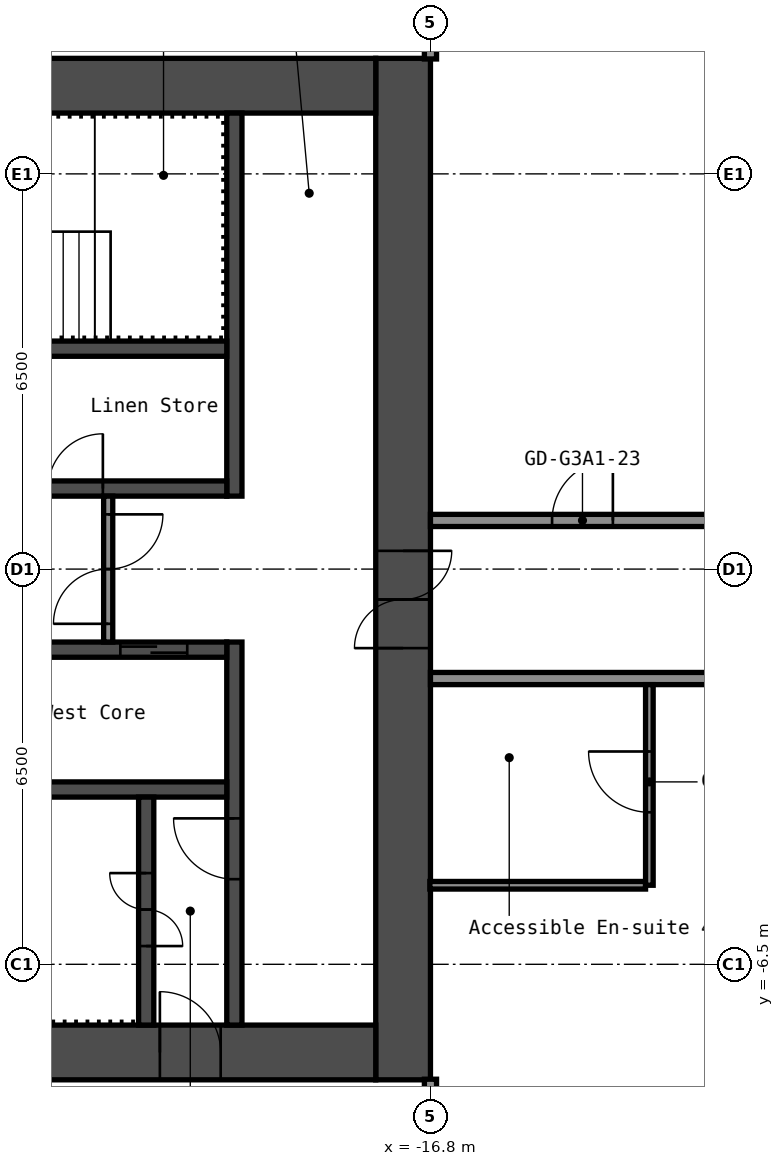
"""IFC4 building model, lengths in metres.
Left out: names, types, materials, properties, quantities, classifications, styles, units other than length and angle.
Written with IfcOpenShell. Run it as: python <this file> out.ifc"""

import sys

from ifc_helpers import new_model, si_unit, direction, frame, frame_2d, origin, place, context, subcontext, project, spatial, rectangle, extrude, element, fill, save


model = new_model("IFC4")
c1 = context("Model", 3, precision=1e-05, world=origin(), true_north=direction((0.0, 1.0)))
c2 = subcontext(c1, "Body", "Model", "MODEL_VIEW")
j1 = project(units=[si_unit("LENGTHUNIT", "METRE"), si_unit("PLANEANGLEUNIT", "RADIAN")], contexts=[c1])
p1 = place(None, origin())
s1 = spatial("IfcSite", under=j1, at=p1, CompositionType="ELEMENT")
p2 = place(p1, origin())
s2 = spatial("IfcBuilding", under=s1, at=p2, CompositionType="ELEMENT")
p3 = place(p2, frame((0.0, 0.0, 147.0)))
s3 = spatial("IfcBuildingStorey", under=s2, at=p3, CompositionType="ELEMENT", Elevation=147.0)
p4 = place(p3, frame((-17.25, -8.4, 0.0), z_axis=(0.0, 0.0, 1.0), x_axis=(0.0, 1.0, 0.0)))
e1 = element("IfcWall", 1, at=p4, inside=s3, PredefinedType="SHEAR", context=c2, shape_type="SweptSolid", body=[
    extrude(rectangle(XDim=16.8, YDim=0.9, at=frame_2d((8.4, 0.0))), origin(), (0.0, 0.0, 1.0), 2.75),
])
p5 = place(p4, frame((7.1, 0.0, 0.0)))
e2 = element("IfcOpeningElement", 2, at=p5, cuts=e1, PredefinedType="OPENING", context=c2, shape_type="SweptSolid", body=[
    extrude(rectangle(XDim=1.6, YDim=2.1, at=frame_2d((0.8, 1.05))), frame((0.0, 0.46, 0.0), z_axis=(0.0, -1.0, 0.0), x_axis=(1.0, 0.0, 0.0)), (0.0, 0.0, 1.0), 0.92),
])
p6 = place(p3, frame((-32.7, 7.95, 0.0), z_axis=(0.0, 0.0, 1.0), x_axis=(1.0, 0.0, 0.0)))
e3 = element("IfcWall", 3, at=p6, inside=s3, PredefinedType="SHEAR", context=c2, shape_type="SweptSolid", body=[
    extrude(rectangle(XDim=15.0, YDim=0.9, at=frame_2d((7.5, 0.0))), origin(), (0.0, 0.0, 1.0), 2.75),
])
p7 = place(p6, frame((3.4, 0.0, 0.0)))
e4 = element("IfcOpeningElement", 4, at=p7, cuts=e3, PredefinedType="OPENING", context=c2, shape_type="SweptSolid", body=[
    extrude(rectangle(XDim=1.2, YDim=2.1, at=frame_2d((0.6, 1.05))), frame((0.0, 0.46, 0.0), z_axis=(0.0, -1.0, 0.0), x_axis=(1.0, 0.0, 0.0)), (0.0, 0.0, 1.0), 0.92),
])
p8 = place(p6, frame((0.75, 0.0, 0.0)))
e5 = element("IfcOpeningElement", 5, at=p8, cuts=e3, PredefinedType="OPENING", context=c2, shape_type="SweptSolid", body=[
    extrude(rectangle(XDim=0.9, YDim=2.1, at=frame_2d((0.45, 1.05))), frame((0.0, 0.46, 0.0), z_axis=(0.0, -1.0, 0.0), x_axis=(1.0, 0.0, 0.0)), (0.0, 0.0, 1.0), 0.92),
])
p9 = place(p3, frame((-32.7, -7.95, 0.0), z_axis=(0.0, 0.0, 1.0), x_axis=(1.0, 0.0, 0.0)))
e6 = element("IfcWall", 6, at=p9, inside=s3, PredefinedType="SHEAR", context=c2, shape_type="SweptSolid", body=[
    extrude(rectangle(XDim=15.0, YDim=0.9, at=frame_2d((7.5, 0.0))), origin(), (0.0, 0.0, 1.0), 2.75),
])
p10 = place(p9, frame((11.45, 0.0, 0.0)))
e7 = element("IfcOpeningElement", 7, at=p10, cuts=e6, PredefinedType="OPENING", context=c2, shape_type="SweptSolid", body=[
    extrude(rectangle(XDim=1.0, YDim=2.1, at=frame_2d((0.5, 1.05))), frame((0.0, 0.46, 0.0), z_axis=(0.0, -1.0, 0.0), x_axis=(1.0, 0.0, 0.0)), (0.0, 0.0, 1.0), 0.92),
])
p11 = place(p3, frame((-20.025, 1.2, 0.0), z_axis=(0.0, 0.0, 1.0), x_axis=(0.0, 1.0, 0.0)))
e8 = element("IfcWall", 8, at=p11, inside=s3, PredefinedType="SHEAR", context=c2, shape_type="SweptSolid", body=[
    extrude(rectangle(XDim=6.3, YDim=0.25, at=frame_2d((3.15, 0.0))), origin(), (0.0, 0.0, 1.0), 2.75),
])
p12 = place(p3, frame((-20.025, -7.5, 0.0), z_axis=(0.0, 0.0, 1.0), x_axis=(0.0, 1.0, 0.0)))
e9 = element("IfcWall", 9, at=p12, inside=s3, PredefinedType="SHEAR", context=c2, shape_type="SweptSolid", body=[
    extrude(rectangle(XDim=6.3, YDim=0.25, at=frame_2d((3.15, 0.0))), origin(), (0.0, 0.0, 1.0), 2.75),
])
p13 = place(p12, frame((2.4, 0.0, 0.0)))
e10 = element("IfcOpeningElement", 10, at=p13, cuts=e9, PredefinedType="OPENING", context=c2, shape_type="SweptSolid", body=[
    extrude(rectangle(XDim=1.0, YDim=2.1, at=frame_2d((0.5, 1.05))), frame((0.0, 0.135, 0.0), z_axis=(0.0, -1.0, 0.0), x_axis=(1.0, 0.0, 0.0)), (0.0, 0.0, 1.0), 0.27),
])
p14 = place(p3, frame((-27.65, 1.325, 0.0), z_axis=(0.0, 0.0, 1.0), x_axis=(1.0, 0.0, 0.0)))
e11 = element("IfcWall", 11, at=p14, inside=s3, PredefinedType="SHEAR", context=c2, shape_type="SweptSolid", body=[
    extrude(rectangle(XDim=7.5, YDim=0.25, at=frame_2d((3.75, 0.0))), origin(), (0.0, 0.0, 1.0), 2.75),
])
p15 = place(p14, frame((4.562, 0.0, 0.0)))
e12 = element("IfcOpeningElement", 12, at=p15, cuts=e11, PredefinedType="OPENING", context=c2, shape_type="SweptSolid", body=[
    extrude(rectangle(XDim=0.9, YDim=2.1, at=frame_2d((0.45, 1.05))), frame((0.0, 0.135, 0.0), z_axis=(0.0, -1.0, 0.0), x_axis=(1.0, 0.0, 0.0)), (0.0, 0.0, 1.0), 0.27),
])
p16 = place(p14, frame((0.863, 0.0, 0.0)))
e13 = element("IfcOpeningElement", 13, at=p16, cuts=e11, PredefinedType="OPENING", context=c2, shape_type="SweptSolid", body=[
    extrude(rectangle(XDim=0.9, YDim=2.1, at=frame_2d((0.45, 1.05))), frame((0.0, 0.135, 0.0), z_axis=(0.0, -1.0, 0.0), x_axis=(1.0, 0.0, 0.0)), (0.0, 0.0, 1.0), 0.27),
])
p17 = place(p3, frame((-27.65, 3.625, 0.0), z_axis=(0.0, 0.0, 1.0), x_axis=(1.0, 0.0, 0.0)))
e14 = element("IfcWall", 14, at=p17, inside=s3, PredefinedType="SHEAR", context=c2, shape_type="SweptSolid", body=[
    extrude(rectangle(XDim=7.5, YDim=0.25, at=frame_2d((3.75, 0.0))), origin(), (0.0, 0.0, 1.0), 2.75),
])
p18 = place(p3, frame((-27.65, -1.325, 0.0), z_axis=(0.0, 0.0, 1.0), x_axis=(1.0, 0.0, 0.0)))
e15 = element("IfcWall", 15, at=p18, inside=s3, PredefinedType="SHEAR", context=c2, shape_type="SweptSolid", body=[
    extrude(rectangle(XDim=7.5, YDim=0.25, at=frame_2d((3.75, 0.0))), origin(), (0.0, 0.0, 1.0), 2.75),
])
p19 = place(p18, frame((5.75, 0.0, 0.0)))
e16 = element("IfcOpeningElement", 16, at=p19, cuts=e15, PredefinedType="OPENING", context=c2, shape_type="SweptSolid", body=[
    extrude(rectangle(XDim=1.1, YDim=2.1, at=frame_2d((0.55, 1.05))), frame((0.0, 0.135, 0.0), z_axis=(0.0, -1.0, 0.0), x_axis=(1.0, 0.0, 0.0)), (0.0, 0.0, 1.0), 0.27),
])
p20 = place(p18, frame((3.35, 0.0, 0.0)))
e17 = element("IfcOpeningElement", 17, at=p20, cuts=e15, PredefinedType="OPENING", context=c2, shape_type="SweptSolid", body=[
    extrude(rectangle(XDim=1.1, YDim=2.1, at=frame_2d((0.55, 1.05))), frame((0.0, 0.135, 0.0), z_axis=(0.0, -1.0, 0.0), x_axis=(1.0, 0.0, 0.0)), (0.0, 0.0, 1.0), 0.27),
])
p21 = place(p18, frame((0.95, 0.0, 0.0)))
e18 = element("IfcOpeningElement", 18, at=p21, cuts=e15, PredefinedType="OPENING", context=c2, shape_type="SweptSolid", body=[
    extrude(rectangle(XDim=1.1, YDim=2.1, at=frame_2d((0.55, 1.05))), frame((0.0, 0.135, 0.0), z_axis=(0.0, -1.0, 0.0), x_axis=(1.0, 0.0, 0.0)), (0.0, 0.0, 1.0), 0.27),
])
p22 = place(p3, frame((-27.65, -3.625, 0.0), z_axis=(0.0, 0.0, 1.0), x_axis=(1.0, 0.0, 0.0)))
e19 = element("IfcWall", 19, at=p22, inside=s3, PredefinedType="SHEAR", context=c2, shape_type="SweptSolid", body=[
    extrude(rectangle(XDim=7.5, YDim=0.25, at=frame_2d((3.75, 0.0))), origin(), (0.0, 0.0, 1.0), 2.75),
])
p23 = place(p3, frame((-21.475, -7.5, 0.0), z_axis=(0.0, 0.0, 1.0), x_axis=(0.0, 1.0, 0.0)))
e20 = element("IfcWall", 20, at=p23, inside=s3, PredefinedType="SHEAR", context=c2, shape_type="SweptSolid", body=[
    extrude(rectangle(XDim=3.75, YDim=0.25, at=frame_2d((1.875, 0.0))), origin(), (0.0, 0.0, 1.0), 2.75),
])
p24 = place(p23, frame((1.3, 0.0, 0.0)))
e21 = element("IfcOpeningElement", 21, at=p24, cuts=e20, PredefinedType="OPENING", context=c2, shape_type="SweptSolid", body=[
    extrude(rectangle(XDim=1.2, YDim=2.1, at=frame_2d((0.6, 1.05))), frame((0.0, 0.135, 0.0), z_axis=(0.0, -1.0, 0.0), x_axis=(1.0, 0.0, 0.0)), (0.0, 0.0, 1.0), 0.27),
])
p25 = place(p3, frame((-22.1, -1.2, 0.0), z_axis=(0.0, 0.0, 1.0), x_axis=(0.0, 1.0, 0.0)))
e22 = element("IfcWall", 22, at=p25, inside=s3, PredefinedType="PARTITIONING", context=c2, shape_type="SweptSolid", body=[
    extrude(rectangle(XDim=2.4, YDim=0.15, at=frame_2d((1.2, 0.0))), origin(), (0.0, 0.0, 1.0), 2.75),
])
p26 = place(p25, frame((0.3, 0.0, 0.0)))
e23 = element("IfcOpeningElement", 23, at=p26, cuts=e22, PredefinedType="OPENING", context=c2, shape_type="SweptSolid", body=[
    extrude(rectangle(XDim=1.8, YDim=2.1, at=frame_2d((0.9, 1.05))), frame((0.0, 0.085, 0.0), z_axis=(0.0, -1.0, 0.0), x_axis=(1.0, 0.0, 0.0)), (0.0, 0.0, 1.0), 0.17),
])
p27 = place(p3, frame((-16.81, -5.2, 0.0), z_axis=(0.0, 0.0, 1.0), x_axis=(1.0, 0.0, 0.0)))
e24 = element("IfcWall", 24, at=p27, inside=s3, PredefinedType="PARTITIONING", context=c2, shape_type="SweptSolid", body=[
    extrude(rectangle(XDim=3.548, YDim=0.125, at=frame_2d((1.774, 0.0))), origin(), (0.0, 0.0, 1.0), 2.75),
])
p28 = place(p3, frame((-16.8, -1.8, 0.0), z_axis=(0.0, 0.0, 1.0), x_axis=(1.0, 0.0, 0.0)))
e25 = element("IfcWall", 25, at=p28, inside=s3, PredefinedType="PARTITIONING", context=c2, shape_type="SweptSolid", body=[
    extrude(rectangle(XDim=33.6, YDim=0.2, at=frame_2d((16.8, 0.0))), origin(), (0.0, 0.0, 1.0), 2.75),
])
p29 = place(p28, frame((5.5, 0.0, 0.0)))
e26 = element("IfcOpeningElement", 26, at=p29, cuts=e25, PredefinedType="OPENING", context=c2, shape_type="SweptSolid", body=[
    extrude(rectangle(XDim=1.0, YDim=2.1, at=frame_2d((0.5, 1.05))), frame((0.0, 0.11, 0.0), z_axis=(0.0, -1.0, 0.0), x_axis=(1.0, 0.0, 0.0)), (0.0, 0.0, 1.0), 0.22),
])
p30 = place(p28, frame((9.8, 0.0, 0.0)))
e27 = element("IfcOpeningElement", 27, at=p30, cuts=e25, PredefinedType="OPENING", context=c2, shape_type="SweptSolid", body=[
    extrude(rectangle(XDim=0.9, YDim=2.1, at=frame_2d((0.45, 1.05))), frame((0.0, 0.11, 0.0), z_axis=(0.0, -1.0, 0.0), x_axis=(1.0, 0.0, 0.0)), (0.0, 0.0, 1.0), 0.22),
])
p31 = place(p28, frame((14.0, 0.0, 0.0)))
e28 = element("IfcOpeningElement", 28, at=p31, cuts=e25, PredefinedType="OPENING", context=c2, shape_type="SweptSolid", body=[
    extrude(rectangle(XDim=0.9, YDim=2.1, at=frame_2d((0.45, 1.05))), frame((0.0, 0.11, 0.0), z_axis=(0.0, -1.0, 0.0), x_axis=(1.0, 0.0, 0.0)), (0.0, 0.0, 1.0), 0.22),
])
p32 = place(p28, frame((18.8, 0.0, 0.0)))
e29 = element("IfcOpeningElement", 29, at=p32, cuts=e25, PredefinedType="OPENING", context=c2, shape_type="SweptSolid", body=[
    extrude(rectangle(XDim=1.0, YDim=2.1, at=frame_2d((0.5, 1.05))), frame((0.0, 0.11, 0.0), z_axis=(0.0, -1.0, 0.0), x_axis=(1.0, 0.0, 0.0)), (0.0, 0.0, 1.0), 0.22),
])
p33 = place(p28, frame((27.2, 0.0, 0.0)))
e30 = element("IfcOpeningElement", 30, at=p33, cuts=e25, PredefinedType="OPENING", context=c2, shape_type="SweptSolid", body=[
    extrude(rectangle(XDim=1.0, YDim=2.1, at=frame_2d((0.5, 1.05))), frame((0.0, 0.11, 0.0), z_axis=(0.0, -1.0, 0.0), x_axis=(1.0, 0.0, 0.0)), (0.0, 0.0, 1.0), 0.22),
])
p34 = place(p3, frame((-16.8, 0.8, 0.0), z_axis=(0.0, 0.0, 1.0), x_axis=(1.0, 0.0, 0.0)))
e31 = element("IfcWall", 31, at=p34, inside=s3, PredefinedType="PARTITIONING", context=c2, shape_type="SweptSolid", body=[
    extrude(rectangle(XDim=33.6, YDim=0.2, at=frame_2d((16.8, 0.0))), origin(), (0.0, 0.0, 1.0), 2.75),
])
p35 = place(p34, frame((2.0, 0.0, 0.0)))
e32 = element("IfcOpeningElement", 32, at=p35, cuts=e31, PredefinedType="OPENING", context=c2, shape_type="SweptSolid", body=[
    extrude(rectangle(XDim=1.0, YDim=2.1, at=frame_2d((0.5, 1.05))), frame((0.0, 0.11, 0.0), z_axis=(0.0, -1.0, 0.0), x_axis=(1.0, 0.0, 0.0)), (0.0, 0.0, 1.0), 0.22),
])
p36 = place(p34, frame((12.1, 0.0, 0.0)))
e33 = element("IfcOpeningElement", 33, at=p36, cuts=e31, PredefinedType="OPENING", context=c2, shape_type="SweptSolid", body=[
    extrude(rectangle(XDim=1.0, YDim=2.1, at=frame_2d((0.5, 1.05))), frame((0.0, 0.11, 0.0), z_axis=(0.0, -1.0, 0.0), x_axis=(1.0, 0.0, 0.0)), (0.0, 0.0, 1.0), 0.22),
])
p37 = place(p34, frame((18.7, 0.0, 0.0)))
e34 = element("IfcOpeningElement", 34, at=p37, cuts=e31, PredefinedType="OPENING", context=c2, shape_type="SweptSolid", body=[
    extrude(rectangle(XDim=0.9, YDim=2.1, at=frame_2d((0.45, 1.05))), frame((0.0, 0.11, 0.0), z_axis=(0.0, -1.0, 0.0), x_axis=(1.0, 0.0, 0.0)), (0.0, 0.0, 1.0), 0.22),
])
p38 = place(p34, frame((22.9, 0.0, 0.0)))
e35 = element("IfcOpeningElement", 35, at=p38, cuts=e31, PredefinedType="OPENING", context=c2, shape_type="SweptSolid", body=[
    extrude(rectangle(XDim=0.9, YDim=2.1, at=frame_2d((0.45, 1.05))), frame((0.0, 0.11, 0.0), z_axis=(0.0, -1.0, 0.0), x_axis=(1.0, 0.0, 0.0)), (0.0, 0.0, 1.0), 0.22),
])
p39 = place(p34, frame((27.2, 0.0, 0.0)))
e36 = element("IfcOpeningElement", 36, at=p39, cuts=e31, PredefinedType="OPENING", context=c2, shape_type="SweptSolid", body=[
    extrude(rectangle(XDim=1.0, YDim=2.1, at=frame_2d((0.5, 1.05))), frame((0.0, 0.11, 0.0), z_axis=(0.0, -1.0, 0.0), x_axis=(1.0, 0.0, 0.0)), (0.0, 0.0, 1.0), 0.22),
])
p40 = place(p3, frame((-16.8, -19.3, 0.0), z_axis=(0.0, 0.0, 1.0), x_axis=(0.0, 1.0, 0.0)))
e37 = element("IfcWall", 37, at=p40, inside=s3, PredefinedType="PARTITIONING", context=c2, shape_type="SweptSolid", body=[
    extrude(rectangle(XDim=10.91, YDim=0.2, at=frame_2d((5.455, 0.0))), origin(), (0.0, 0.0, 1.0), 2.75),
])
p41 = place(p3, frame((-16.8, 8.39, 0.0), z_axis=(0.0, 0.0, 1.0), x_axis=(0.0, 1.0, 0.0)))
e38 = element("IfcWall", 38, at=p41, inside=s3, PredefinedType="PARTITIONING", context=c2, shape_type="SweptSolid", body=[
    extrude(rectangle(XDim=9.91, YDim=0.2, at=frame_2d((4.955, 0.0))), origin(), (0.0, 0.0, 1.0), 2.75),
])
p42 = place(p3, frame((-13.2, -5.2, 0.0), z_axis=(0.0, 0.0, 1.0), x_axis=(0.0, 1.0, 0.0)))
e39 = element("IfcWall", 39, at=p42, inside=s3, PredefinedType="PARTITIONING", context=c2, shape_type="SweptSolid", body=[
    extrude(rectangle(XDim=3.3, YDim=0.125, at=frame_2d((1.65, 0.0))), origin(), (0.0, 0.0, 1.0), 2.75),
])
p43 = place(p42, frame((1.2, 0.0, 0.0)))
e40 = element("IfcOpeningElement", 40, at=p43, cuts=e39, PredefinedType="OPENING", context=c2, shape_type="SweptSolid", body=[
    extrude(rectangle(XDim=1.0, YDim=2.1, at=frame_2d((0.5, 1.05))), frame((0.0, 0.073, 0.0), z_axis=(0.0, -1.0, 0.0), x_axis=(1.0, 0.0, 0.0)), (0.0, 0.0, 1.0), 0.145),
])
p44 = place(p5, origin())
e41 = element("IfcDoor", 41, at=p44, inside=s3, OperationType="DOUBLE_DOOR_SINGLE_SWING", PredefinedType="DOOR", context=c2, shape_type="SweptSolid", body=[
    extrude(rectangle(XDim=1.6, YDim=2.1, at=frame_2d((0.8, 1.05))), frame((0.0, 0.025, 0.0), z_axis=(0.0, -1.0, 0.0), x_axis=(1.0, 0.0, 0.0)), (0.0, 0.0, 1.0), 0.05),
])
fill(e2, e41)
p45 = place(p10, origin())
e42 = element("IfcDoor", 42, at=p45, inside=s3, OperationType="SINGLE_SWING_RIGHT", PredefinedType="DOOR", context=c2, shape_type="SweptSolid", body=[
    extrude(rectangle(XDim=1.0, YDim=2.1, at=frame_2d((0.5, 1.05))), frame((0.0, 0.025, 0.0), z_axis=(0.0, -1.0, 0.0), x_axis=(1.0, 0.0, 0.0)), (0.0, 0.0, 1.0), 0.05),
])
fill(e7, e42)
p46 = place(p24, origin())
e43 = element("IfcDoor", 43, at=p46, inside=s3, OperationType="DOUBLE_DOOR_SINGLE_SWING", PredefinedType="DOOR", context=c2, shape_type="SweptSolid", body=[
    extrude(rectangle(XDim=1.2, YDim=2.1, at=frame_2d((0.6, 1.05))), frame((0.0, 0.025, 0.0), z_axis=(0.0, -1.0, 0.0), x_axis=(1.0, 0.0, 0.0)), (0.0, 0.0, 1.0), 0.05),
])
fill(e21, e43)
p47 = place(p13, origin())
e44 = element("IfcDoor", 44, at=p47, inside=s3, OperationType="SINGLE_SWING_LEFT", PredefinedType="DOOR", context=c2, shape_type="SweptSolid", body=[
    extrude(rectangle(XDim=1.0, YDim=2.1, at=frame_2d((0.5, 1.05))), frame((0.0, 0.025, 0.0), z_axis=(0.0, -1.0, 0.0), x_axis=(1.0, 0.0, 0.0)), (0.0, 0.0, 1.0), 0.05),
])
fill(e10, e44)
p48 = place(p26, origin())
e45 = element("IfcDoor", 45, at=p48, inside=s3, OperationType="DOUBLE_DOOR_SINGLE_SWING", PredefinedType="DOOR", context=c2, shape_type="SweptSolid", body=[
    extrude(rectangle(XDim=1.8, YDim=2.1, at=frame_2d((0.9, 1.05))), frame((0.0, 0.025, 0.0), z_axis=(0.0, -1.0, 0.0), x_axis=(1.0, 0.0, 0.0)), (0.0, 0.0, 1.0), 0.05),
])
fill(e23, e45)
p49 = place(p15, origin())
e46 = element("IfcDoor", 46, at=p49, inside=s3, OperationType="SINGLE_SWING_LEFT", PredefinedType="DOOR", context=c2, shape_type="SweptSolid", body=[
    extrude(rectangle(XDim=0.9, YDim=2.1, at=frame_2d((0.45, 1.05))), frame((0.0, 0.025, 0.0), z_axis=(0.0, -1.0, 0.0), x_axis=(1.0, 0.0, 0.0)), (0.0, 0.0, 1.0), 0.05),
])
fill(e12, e46)
p50 = place(p19, origin())
e47 = element("IfcDoor", 47, at=p50, inside=s3, OperationType="DOUBLE_DOOR_SLIDING", PredefinedType="DOOR", context=c2, shape_type="SweptSolid", body=[
    extrude(rectangle(XDim=1.1, YDim=2.1, at=frame_2d((0.55, 1.05))), frame((0.0, 0.025, 0.0), z_axis=(0.0, -1.0, 0.0), x_axis=(1.0, 0.0, 0.0)), (0.0, 0.0, 1.0), 0.05),
])
fill(e16, e47)
p51 = place(p35, origin())
e48 = element("IfcDoor", 48, at=p51, inside=s3, OperationType="SINGLE_SWING_LEFT", PredefinedType="DOOR", context=c2, shape_type="SweptSolid", body=[
    extrude(rectangle(XDim=1.0, YDim=2.1, at=frame_2d((0.5, 1.05))), frame((0.0, 0.025, 0.0), z_axis=(0.0, -1.0, 0.0), x_axis=(1.0, 0.0, 0.0)), (0.0, 0.0, 1.0), 0.05),
])
fill(e32, e48)
p52 = place(p43, origin())
e49 = element("IfcDoor", 49, at=p52, inside=s3, OperationType="SINGLE_SWING_LEFT", PredefinedType="DOOR", context=c2, shape_type="SweptSolid", body=[
    extrude(rectangle(XDim=1.0, YDim=2.1, at=frame_2d((0.5, 1.05))), frame((0.0, 0.025, 0.0), z_axis=(0.0, -1.0, 0.0), x_axis=(1.0, 0.0, 0.0)), (0.0, 0.0, 1.0), 0.05),
])
fill(e40, e49)
save(model, sys.argv[1])
